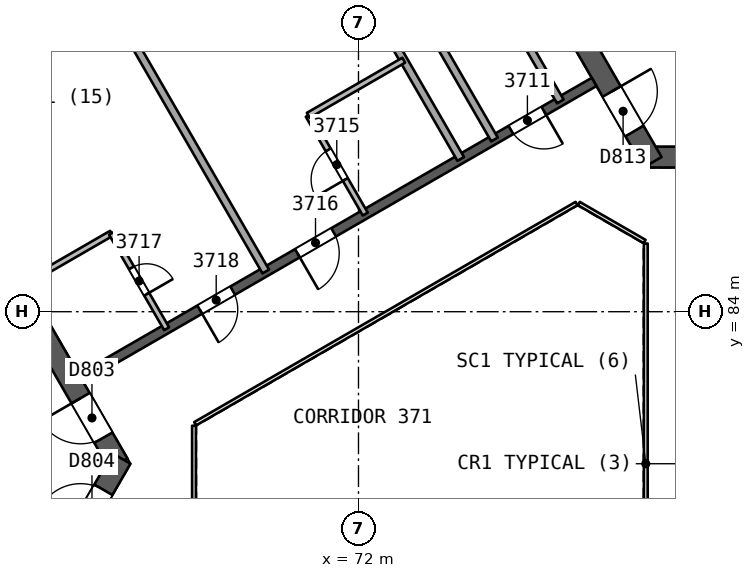
"""IFC4 building model, lengths in metres.
Left out: names, types, materials, properties, quantities, classifications, styles, units other than length and angle.
Written with IfcOpenShell. Run it as: python <this file> out.ifc"""

import sys

from ifc_helpers import new_model, si_unit, direction, frame, frame_2d, origin, place, context, subcontext, project, spatial, rectangle, extrude, element, fill, save


model = new_model("IFC4")
c1 = context("Model", 3, precision=1e-05, world=origin(), true_north=direction((0.0, 1.0)))
c2 = subcontext(c1, "Body", "Model", "MODEL_VIEW")
j1 = project(units=[si_unit("LENGTHUNIT", "METRE"), si_unit("PLANEANGLEUNIT", "RADIAN")], contexts=[c1])
p1 = place(None, origin())
s1 = spatial("IfcSite", under=j1, at=p1, CompositionType="ELEMENT")
p2 = place(p1, origin())
s2 = spatial("IfcBuilding", under=s1, at=p2, CompositionType="ELEMENT")
p3 = place(p2, frame((0.0, 0.0, 156.3)))
s3 = spatial("IfcBuildingStorey", under=s2, at=p3, CompositionType="ELEMENT", Elevation=156.3)
p4 = place(p3, frame((65.682, 80.0, 0.0), z_axis=(0.0, 0.0, 1.0), x_axis=(-0.500000202252, 0.866025287014, 0.0)))
e1 = element("IfcWall", 1, at=p4, inside=s3, PredefinedType="SHEAR", context=c2, shape_type="SweptSolid", body=[
    extrude(rectangle(XDim=10.221, YDim=0.55, at=frame_2d((5.111, 0.0))), origin(), (0.0, 0.0, 1.0), 3.7),
])
p5 = place(p4, frame((0.791, 0.0, 0.0)))
e2 = element("IfcOpeningElement", 2, at=p5, cuts=e1, PredefinedType="OPENING", context=c2, shape_type="SweptSolid", body=[
    extrude(rectangle(XDim=1.2, YDim=2.1, at=frame_2d((0.6, 1.05))), frame((0.0, 0.286, 0.0), z_axis=(0.0, -1.0, 0.0), x_axis=(1.0, 0.0, 0.0)), (0.0, 0.0, 1.0), 0.571),
])
p6 = place(p3, frame((60.709, 71.386, 0.0), z_axis=(0.0, 0.0, 1.0), x_axis=(0.500015938302, 0.866016201606, 0.0)))
e3 = element("IfcWall", 3, at=p6, inside=s3, PredefinedType="SHEAR", context=c2, shape_type="SweptSolid", body=[
    extrude(rectangle(XDim=10.105, YDim=0.55, at=frame_2d((5.053, 0.0))), origin(), (0.0, 0.0, 1.0), 3.7),
])
p7 = place(p6, frame((7.955, 0.0, 0.0)))
e4 = element("IfcOpeningElement", 4, at=p7, cuts=e3, PredefinedType="OPENING", context=c2, shape_type="SweptSolid", body=[
    extrude(rectangle(XDim=1.2, YDim=2.1, at=frame_2d((0.6, 1.05))), frame((0.0, 0.286, 0.0), z_axis=(0.0, -1.0, 0.0), x_axis=(1.0, 0.0, 0.0)), (0.0, 0.0, 1.0), 0.571),
])
p8 = place(p3, frame((79.659, 88.069, 0.0), z_axis=(0.0, 0.0, 1.0), x_axis=(1.0, 0.0, 0.0)))
e5 = element("IfcWall", 5, at=p8, inside=s3, PredefinedType="SHEAR", context=c2, shape_type="SweptSolid", body=[
    extrude(rectangle(XDim=10.221, YDim=0.55, at=frame_2d((5.111, 0.0))), origin(), (0.0, 0.0, 1.0), 3.7),
])
p9 = place(p8, frame((0.791, 0.0, 0.0)))
e6 = element("IfcOpeningElement", 6, at=p9, cuts=e5, PredefinedType="OPENING", context=c2, shape_type="SweptSolid", body=[
    extrude(rectangle(XDim=1.2, YDim=2.1, at=frame_2d((0.6, 1.05))), frame((0.0, 0.286, 0.0), z_axis=(0.0, -1.0, 0.0), x_axis=(1.0, 0.0, 0.0)), (0.0, 0.0, 1.0), 0.571),
])
p10 = place(p3, frame((74.686, 96.683, 0.0), z_axis=(0.0, 0.0, 1.0), x_axis=(0.499997818338, -0.866026663364, 0.0)))
e7 = element("IfcWall", 7, at=p10, inside=s3, PredefinedType="SHEAR", context=c2, shape_type="SweptSolid", body=[
    extrude(rectangle(XDim=10.105, YDim=0.55, at=frame_2d((5.052, 0.0))), origin(), (0.0, 0.0, 1.0), 3.7),
])
p11 = place(p10, frame((7.955, 0.0, 0.0)))
e8 = element("IfcOpeningElement", 8, at=p11, cuts=e7, PredefinedType="OPENING", context=c2, shape_type="SweptSolid", body=[
    extrude(rectangle(XDim=1.2, YDim=2.1, at=frame_2d((0.6, 1.05))), frame((0.0, 0.286, 0.0), z_axis=(0.0, -1.0, 0.0), x_axis=(1.0, 0.0, 0.0)), (0.0, 0.0, 1.0), 0.571),
])
p12 = place(p3, frame((78.2, 90.046, 0.0), z_axis=(0.0, 0.0, 1.0), x_axis=(-0.866026492143, -0.499998114903, 0.0)))
e9 = element("IfcWall", 9, at=p12, inside=s3, PredefinedType="SHEAR", context=c2, shape_type="SweptSolid", body=[
    extrude(rectangle(XDim=15.588, YDim=0.25, at=frame_2d((7.794, 0.0))), origin(), (0.0, 0.0, 1.0), 3.25),
])
p13 = place(p12, frame((1.527, 0.0, 0.0)))
e10 = element("IfcOpeningElement", 10, at=p13, cuts=e9, PredefinedType="OPENING", context=c2, shape_type="SweptSolid", body=[
    extrude(rectangle(XDim=1.0, YDim=2.1, at=frame_2d((0.5, 1.05))), frame((0.0, 0.135, 0.0), z_axis=(0.0, -1.0, 0.0), x_axis=(1.0, 0.0, 0.0)), (0.0, 0.0, 1.0), 0.271),
])
p14 = place(p12, frame((7.915, 0.0, 0.0)))
e11 = element("IfcOpeningElement", 11, at=p14, cuts=e9, PredefinedType="OPENING", context=c2, shape_type="SweptSolid", body=[
    extrude(rectangle(XDim=1.1, YDim=2.1, at=frame_2d((0.55, 1.05))), frame((0.0, 0.135, 0.0), z_axis=(0.0, -1.0, 0.0), x_axis=(1.0, 0.0, 0.0)), (0.0, 0.0, 1.0), 0.271),
])
p15 = place(p12, frame((10.982, 0.0, 0.0)))
e12 = element("IfcOpeningElement", 12, at=p15, cuts=e9, PredefinedType="OPENING", context=c2, shape_type="SweptSolid", body=[
    extrude(rectangle(XDim=1.0, YDim=2.1, at=frame_2d((0.5, 1.05))), frame((0.0, 0.135, 0.0), z_axis=(0.0, -1.0, 0.0), x_axis=(1.0, 0.0, 0.0)), (0.0, 0.0, 1.0), 0.271),
])
for number, where, z_axis, x_axis in (
    (13, (75.579, 88.533, 0.0), (0.0, 0.0, 1.0), (-0.5, 0.866, 0.0)),
    (14, (72.811, 97.327, 0.0), (0.0, 0.0, 1.0), (0.5, -0.866, 0.0)),
):
    element("IfcWall", number, at=place(p3, frame(where, z_axis=z_axis, x_axis=x_axis)), inside=s3, PredefinedType="PARTITIONING", context=c2, shape_type="SweptSolid", body=[
        extrude(rectangle(XDim=9.0, YDim=0.2, at=frame_2d((4.5, 0.0))), origin(), (0.0, 0.0, 1.0), 3.25),
    ])
p16 = place(p3, frame((68.839, 98.153, 0.0), z_axis=(0.0, 0.0, 1.0), x_axis=(0.499998785317, -0.866026105081, 0.0)))
e15 = element("IfcWall", 15, at=p16, inside=s3, PredefinedType="PARTITIONING", context=c2, shape_type="SweptSolid", body=[
    extrude(rectangle(XDim=11.701, YDim=0.2, at=frame_2d((5.851, 0.0))), origin(), (0.0, 0.0, 1.0), 3.25),
])
p17 = place(p3, frame((72.178, 86.569, 0.0), z_axis=(0.0, 0.0, 1.0), x_axis=(-0.499990139034, 0.866031096941, 0.0)))
e16 = element("IfcWall", 16, at=p17, inside=s3, PredefinedType="PARTITIONING", context=c2, shape_type="SweptSolid", body=[
    extrude(rectangle(XDim=3.0, YDim=0.15, at=frame_2d((1.5, 0.0))), origin(), (0.0, 0.0, 1.0), 3.25),
])
p18 = place(p17, frame((1.05, 0.0, 0.0)))
e17 = element("IfcOpeningElement", 17, at=p18, cuts=e16, PredefinedType="OPENING", context=c2, shape_type="SweptSolid", body=[
    extrude(rectangle(XDim=0.9, YDim=2.1, at=frame_2d((0.45, 1.05))), frame((0.0, 0.085, 0.0), z_axis=(0.0, -1.0, 0.0), x_axis=(1.0, 0.0, 0.0)), (0.0, 0.0, 1.0), 0.171),
])
p19 = place(p3, frame((70.678, 89.167, 0.0), z_axis=(0.0, 0.0, 1.0), x_axis=(0.866032775405, 0.499987231761, 0.0)))
e18 = element("IfcWall", 18, at=p19, inside=s3, PredefinedType="PARTITIONING", context=c2, shape_type="SweptSolid", body=[
    extrude(rectangle(XDim=2.9, YDim=0.15, at=frame_2d((1.45, 0.0))), origin(), (0.0, 0.0, 1.0), 3.25),
])
p20 = place(p3, frame((63.709, 95.191, 0.0), z_axis=(0.0, 0.0, 1.0), x_axis=(0.499998785317, -0.866026105081, 0.0)))
e19 = element("IfcWall", 19, at=p20, inside=s3, PredefinedType="PARTITIONING", context=c2, shape_type="SweptSolid", body=[
    extrude(rectangle(XDim=11.701, YDim=0.2, at=frame_2d((5.851, 0.0))), origin(), (0.0, 0.0, 1.0), 3.25),
])
p21 = place(p3, frame((63.422, 84.863, 0.0), z_axis=(0.0, 0.0, 1.0), x_axis=(0.865994240961, 0.500053971709, 0.0)))
e20 = element("IfcWall", 20, at=p21, inside=s3, PredefinedType="PARTITIONING", context=c2, shape_type="SweptSolid", body=[
    extrude(rectangle(XDim=2.401, YDim=0.15, at=frame_2d((1.201, 0.0))), origin(), (0.0, 0.0, 1.0), 3.25),
])
p22 = place(p3, frame((65.502, 86.063, 0.0), z_axis=(0.0, 0.0, 1.0), x_axis=(0.499987231761, -0.866032775405, 0.0)))
e21 = element("IfcWall", 21, at=p22, inside=s3, PredefinedType="PARTITIONING", context=c2, shape_type="SweptSolid", body=[
    extrude(rectangle(XDim=2.9, YDim=0.15, at=frame_2d((1.45, 0.0))), origin(), (0.0, 0.0, 1.0), 3.25),
])
p23 = place(p22, frame((1.05, 0.0, 0.0)))
e22 = element("IfcOpeningElement", 22, at=p23, cuts=e21, PredefinedType="OPENING", context=c2, shape_type="SweptSolid", body=[
    extrude(rectangle(XDim=0.8, YDim=2.1, at=frame_2d((0.4, 1.05))), frame((0.0, 0.085, 0.0), z_axis=(0.0, -1.0, 0.0), x_axis=(1.0, 0.0, 0.0)), (0.0, 0.0, 1.0), 0.171),
])
p24 = place(p3, frame((41.928, 82.788, 0.0), z_axis=(0.0, 0.0, 1.0), x_axis=(0.866025629663, 0.499999608766, 0.0)))
e23 = element("IfcWall", 23, at=p24, inside=s3, PredefinedType="SOLIDWALL", context=c2, shape_type="SweptSolid", body=[
    extrude(rectangle(XDim=54.494, YDim=0.3, at=frame_2d((27.247, 0.0))), origin(), (0.0, 0.0, 1.0), 3.25),
])
p25 = place(p24, frame((26.826, 0.0, 0.0)))
e24 = element("IfcOpeningElement", 24, at=p25, cuts=e23, PredefinedType="OPENING", context=c2, shape_type="SweptSolid", body=[
    extrude(rectangle(XDim=2.4, YDim=2.4, at=frame_2d((1.2, 1.2))), frame((0.0, 0.161, 0.0), z_axis=(0.0, -1.0, 0.0), x_axis=(1.0, 0.0, 0.0)), (0.0, 0.0, 1.0), 0.321),
])
p26 = place(p24, frame((31.815, 0.0, 0.0)))
e25 = element("IfcOpeningElement", 25, at=p26, cuts=e23, PredefinedType="OPENING", context=c2, shape_type="SweptSolid", body=[
    extrude(rectangle(XDim=2.4, YDim=2.4, at=frame_2d((1.2, 1.2))), frame((0.0, 0.161, 0.0), z_axis=(0.0, -1.0, 0.0), x_axis=(1.0, 0.0, 0.0)), (0.0, 0.0, 1.0), 0.321),
])
p27 = place(p24, frame((42.339, 0.0, 0.0)))
e26 = element("IfcOpeningElement", 26, at=p27, cuts=e23, PredefinedType="OPENING", context=c2, shape_type="SweptSolid", body=[
    extrude(rectangle(XDim=2.4, YDim=2.4, at=frame_2d((1.2, 1.2))), frame((0.0, 0.161, 0.0), z_axis=(0.0, -1.0, 0.0), x_axis=(1.0, 0.0, 0.0)), (0.0, 0.0, 1.0), 0.321),
])
p28 = place(p24, frame((11.289, 0.0, 0.0)))
e27 = element("IfcOpeningElement", 27, at=p28, cuts=e23, PredefinedType="OPENING", context=c2, shape_type="SweptSolid", body=[
    extrude(rectangle(XDim=2.4, YDim=2.4, at=frame_2d((1.2, 1.2))), frame((0.0, 0.161, 0.0), z_axis=(0.0, -1.0, 0.0), x_axis=(1.0, 0.0, 0.0)), (0.0, 0.0, 1.0), 0.321),
])
p29 = place(p3, frame((86.77, 89.486, 0.0), z_axis=(0.0, 0.0, 1.0), x_axis=(-0.86601811187, 0.500012629753, 0.0)))
e28 = element("IfcWall", 28, at=p29, inside=s3, PredefinedType="SOLIDWALL", context=c2, shape_type="SweptSolid", body=[
    extrude(rectangle(XDim=10.9, YDim=0.2, at=frame_2d((5.45, 0.0))), origin(), (0.0, 0.0, 1.0), 3.25),
])
p30 = place(p29, frame((0.575, 0.0, 0.0)))
e29 = element("IfcOpeningElement", 29, at=p30, cuts=e28, PredefinedType="OPENING", context=c2, shape_type="SweptSolid", body=[
    extrude(rectangle(XDim=1.1, YDim=2.1, at=frame_2d((0.55, 1.05))), frame((0.0, 0.11, 0.0), z_axis=(0.0, -1.0, 0.0), x_axis=(1.0, 0.0, 0.0)), (0.0, 0.0, 1.0), 0.221),
])
p31 = place(p29, frame((2.825, 0.0, 0.0)))
e30 = element("IfcOpeningElement", 30, at=p31, cuts=e28, PredefinedType="OPENING", context=c2, shape_type="SweptSolid", body=[
    extrude(rectangle(XDim=1.1, YDim=2.1, at=frame_2d((0.55, 1.05))), frame((0.0, 0.11, 0.0), z_axis=(0.0, -1.0, 0.0), x_axis=(1.0, 0.0, 0.0)), (0.0, 0.0, 1.0), 0.221),
])
p32 = place(p29, frame((5.075, 0.0, 0.0)))
e31 = element("IfcOpeningElement", 31, at=p32, cuts=e28, PredefinedType="OPENING", context=c2, shape_type="SweptSolid", body=[
    extrude(rectangle(XDim=1.1, YDim=2.1, at=frame_2d((0.55, 1.05))), frame((0.0, 0.11, 0.0), z_axis=(0.0, -1.0, 0.0), x_axis=(1.0, 0.0, 0.0)), (0.0, 0.0, 1.0), 0.221),
])
p33 = place(p29, frame((7.325, 0.0, 0.0)))
e32 = element("IfcOpeningElement", 32, at=p33, cuts=e28, PredefinedType="OPENING", context=c2, shape_type="SweptSolid", body=[
    extrude(rectangle(XDim=1.1, YDim=2.1, at=frame_2d((0.55, 1.05))), frame((0.0, 0.11, 0.0), z_axis=(0.0, -1.0, 0.0), x_axis=(1.0, 0.0, 0.0)), (0.0, 0.0, 1.0), 0.221),
])
p34 = place(p3, frame((89.33, 90.872, 0.0), z_axis=(0.0, 0.0, 1.0), x_axis=(-0.866027589512, 0.49999621419, 0.0)))
e33 = element("IfcWall", 33, at=p34, inside=s3, PredefinedType="SOLIDWALL", context=c2, shape_type="SweptSolid", body=[
    extrude(rectangle(XDim=10.524, YDim=0.2, at=frame_2d((5.262, 0.0))), origin(), (0.0, 0.0, 1.0), 3.25),
])
p35 = place(p34, frame((0.312, 0.0, 0.0)))
e34 = element("IfcOpeningElement", 34, at=p35, cuts=e33, PredefinedType="OPENING", context=c2, shape_type="SweptSolid", body=[
    extrude(rectangle(XDim=0.9, YDim=2.1, at=frame_2d((0.45, 1.05))), frame((0.0, 0.11, 0.0), z_axis=(0.0, -1.0, 0.0), x_axis=(1.0, 0.0, 0.0)), (0.0, 0.0, 1.0), 0.221),
])
p36 = place(p3, frame((79.56, 74.206, 0.0), z_axis=(0.0, 0.0, 1.0), x_axis=(0.0, 1.0, 0.0)))
e35 = element("IfcWall", 35, at=p36, inside=s3, PredefinedType="PARTITIONING", context=c2, shape_type="SweptSolid", body=[
    extrude(rectangle(XDim=11.588, YDim=0.1, at=frame_2d((5.794, 0.0))), origin(), (0.0, 0.0, 1.0), 3.25),
])
p37 = place(p3, frame((79.53, 85.846, 0.0), z_axis=(0.0, 0.0, 1.0), x_axis=(-0.866041268327, 0.499972520799, 0.0)))
e36 = element("IfcWall", 36, at=p37, inside=s3, PredefinedType="PARTITIONING", context=c2, shape_type="SweptSolid", body=[
    extrude(rectangle(XDim=2.0, YDim=0.1, at=frame_2d((1.0, 0.0))), origin(), (0.0, 0.0, 1.0), 3.25),
])
p38 = place(p3, frame((77.738, 86.846, 0.0), z_axis=(0.0, 0.0, 1.0), x_axis=(-0.866026658274, -0.499997827154, 0.0)))
e37 = element("IfcWall", 37, at=p38, inside=s3, PredefinedType="PARTITIONING", context=c2, shape_type="SweptSolid", body=[
    extrude(rectangle(XDim=11.588, YDim=0.1, at=frame_2d((5.794, 0.0))), origin(), (0.0, 0.0, 1.0), 3.25),
])
p39 = place(p3, frame((67.672, 81.0, 0.0), z_axis=(0.0, 0.0, 1.0), x_axis=(0.0, -1.0, 0.0)))
e38 = element("IfcWall", 38, at=p39, inside=s3, PredefinedType="PARTITIONING", context=c2, shape_type="SweptSolid", body=[
    extrude(rectangle(XDim=2.0, YDim=0.1, at=frame_2d((1.0, 0.0))), origin(), (0.0, 0.0, 1.0), 3.25),
])
p40 = place(p13, origin())
e39 = element("IfcDoor", 39, at=p40, inside=s3, OperationType="SINGLE_SWING_LEFT", PredefinedType="NOTDEFINED", context=c2, shape_type="SweptSolid", body=[
    extrude(rectangle(XDim=1.0, YDim=2.1, at=frame_2d((0.5, 1.05))), frame((0.0, 0.025, 0.0), z_axis=(0.0, -1.0, 0.0), x_axis=(1.0, 0.0, 0.0)), (0.0, 0.0, 1.0), 0.05),
])
fill(e10, e39)
p41 = place(p18, origin())
e40 = element("IfcDoor", 40, at=p41, inside=s3, OperationType="SINGLE_SWING_LEFT", PredefinedType="NOTDEFINED", context=c2, shape_type="SweptSolid", body=[
    extrude(rectangle(XDim=0.9, YDim=2.1, at=frame_2d((0.45, 1.05))), frame((0.0, 0.025, 0.0), z_axis=(0.0, -1.0, 0.0), x_axis=(1.0, 0.0, 0.0)), (0.0, 0.0, 1.0), 0.05),
])
fill(e17, e40)
p42 = place(p14, origin())
e41 = element("IfcDoor", 41, at=p42, inside=s3, OperationType="SINGLE_SWING_RIGHT", PredefinedType="NOTDEFINED", context=c2, shape_type="SweptSolid", body=[
    extrude(rectangle(XDim=1.1, YDim=2.1, at=frame_2d((0.55, 1.05))), frame((0.0, 0.025, 0.0), z_axis=(0.0, -1.0, 0.0), x_axis=(1.0, 0.0, 0.0)), (0.0, 0.0, 1.0), 0.05),
])
fill(e11, e41)
p43 = place(p23, origin())
e42 = element("IfcDoor", 42, at=p43, inside=s3, OperationType="SINGLE_SWING_RIGHT", PredefinedType="NOTDEFINED", context=c2, shape_type="SweptSolid", body=[
    extrude(rectangle(XDim=0.8, YDim=2.1, at=frame_2d((0.4, 1.05))), frame((0.0, 0.025, 0.0), z_axis=(0.0, -1.0, 0.0), x_axis=(1.0, 0.0, 0.0)), (0.0, 0.0, 1.0), 0.05),
])
fill(e22, e42)
p44 = place(p15, origin())
e43 = element("IfcDoor", 43, at=p44, inside=s3, OperationType="SINGLE_SWING_RIGHT", PredefinedType="NOTDEFINED", context=c2, shape_type="SweptSolid", body=[
    extrude(rectangle(XDim=1.0, YDim=2.1, at=frame_2d((0.5, 1.05))), frame((0.0, 0.025, 0.0), z_axis=(0.0, -1.0, 0.0), x_axis=(1.0, 0.0, 0.0)), (0.0, 0.0, 1.0), 0.05),
])
fill(e12, e43)
p45 = place(p5, origin())
e44 = element("IfcDoor", 44, at=p45, inside=s3, OperationType="SINGLE_SWING_RIGHT", PredefinedType="NOTDEFINED", context=c2, shape_type="SweptSolid", body=[
    extrude(rectangle(XDim=1.2, YDim=2.1, at=frame_2d((0.6, 1.05))), frame((0.0, 0.025, 0.0), z_axis=(0.0, -1.0, 0.0), x_axis=(1.0, 0.0, 0.0)), (0.0, 0.0, 1.0), 0.05),
])
fill(e2, e44)
p46 = place(p7, origin())
e45 = element("IfcDoor", 45, at=p46, inside=s3, OperationType="SINGLE_SWING_LEFT", PredefinedType="NOTDEFINED", context=c2, shape_type="SweptSolid", body=[
    extrude(rectangle(XDim=1.2, YDim=2.1, at=frame_2d((0.6, 1.05))), frame((0.0, 0.025, 0.0), z_axis=(0.0, -1.0, 0.0), x_axis=(1.0, 0.0, 0.0)), (0.0, 0.0, 1.0), 0.05),
])
fill(e4, e45)
p47 = place(p11, origin())
e46 = element("IfcDoor", 46, at=p47, inside=s3, OperationType="SINGLE_SWING_LEFT", PredefinedType="NOTDEFINED", context=c2, shape_type="SweptSolid", body=[
    extrude(rectangle(XDim=1.2, YDim=2.1, at=frame_2d((0.6, 1.05))), frame((0.0, 0.025, 0.0), z_axis=(0.0, -1.0, 0.0), x_axis=(1.0, 0.0, 0.0)), (0.0, 0.0, 1.0), 0.05),
])
fill(e8, e46)
save(model, sys.argv[1])
